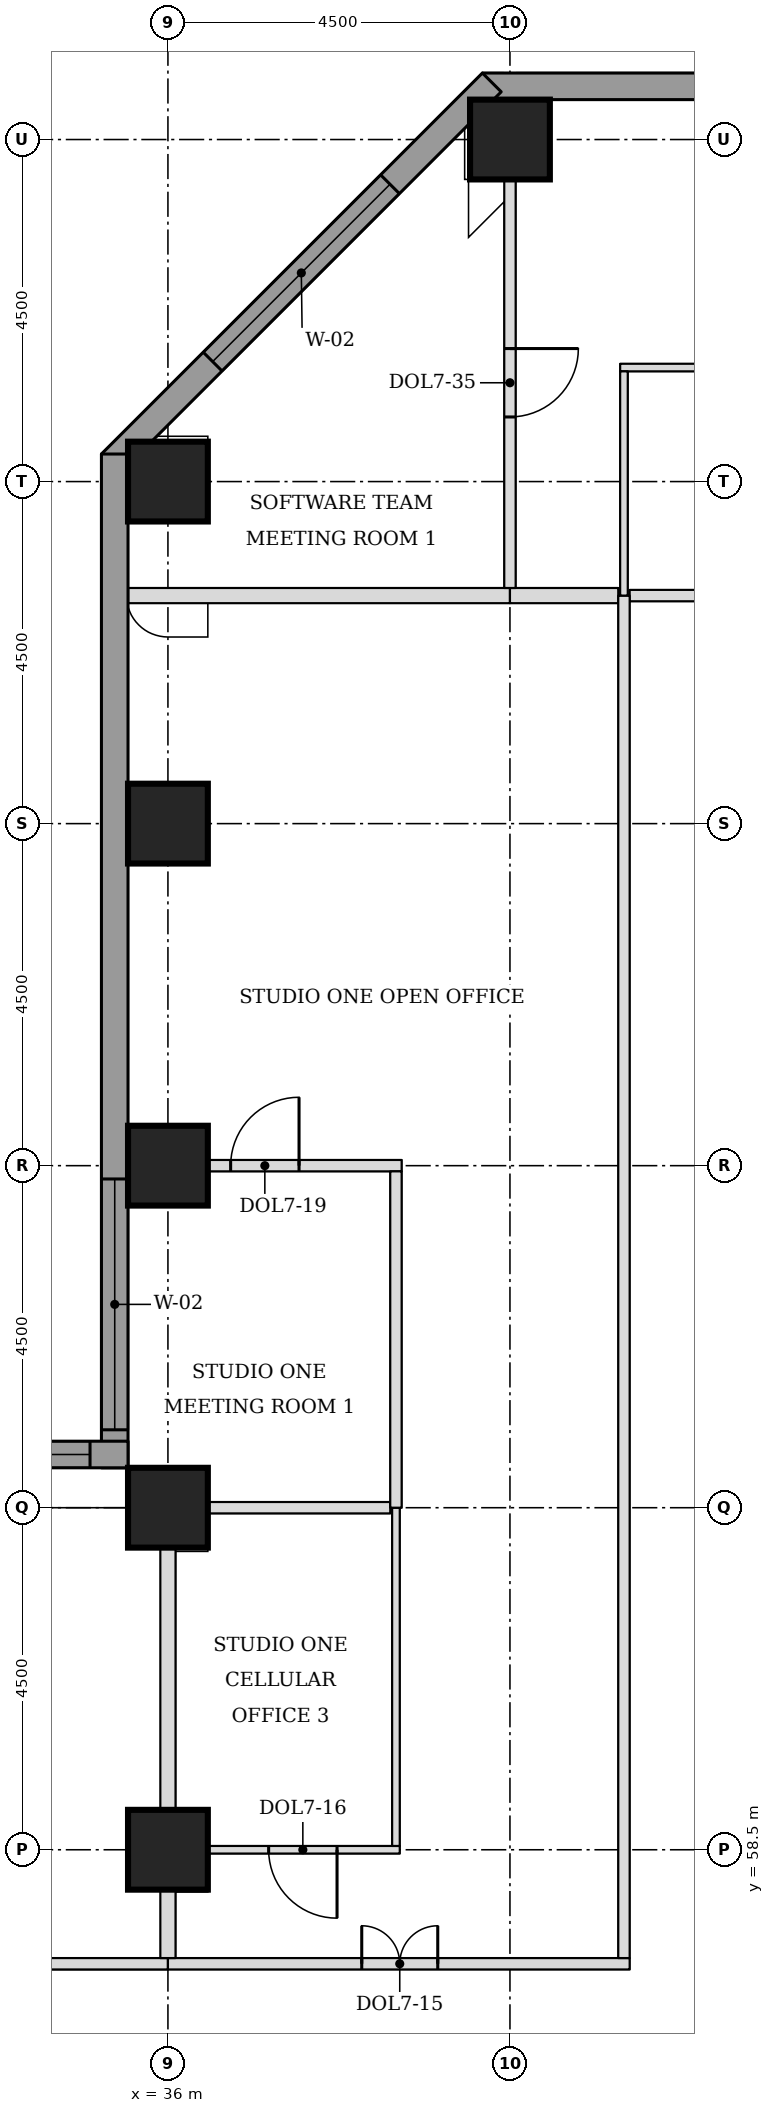
"""IFC4 building model, lengths in metres.
Left out: names, types, materials, properties, quantities, classifications, styles, units other than length and angle.
Written with IfcOpenShell. Run it as: python <this file> out.ifc"""

import sys

from ifc_helpers import new_model, si_unit, direction, frame, frame_2d, origin, origin_2d, place, context, subcontext, project, spatial, rectangle, extrude, element, fill, save


model = new_model("IFC4")
c1 = context("Model", 3, precision=1e-05, world=origin(), true_north=direction((0.0, 1.0)))
c2 = subcontext(c1, "Body", "Model", "MODEL_VIEW")
j1 = project(units=[si_unit("LENGTHUNIT", "METRE"), si_unit("PLANEANGLEUNIT", "RADIAN")], contexts=[c1])
p1 = place(None, origin())
s1 = spatial("IfcSite", under=j1, at=p1, CompositionType="ELEMENT")
p2 = place(p1, origin())
s2 = spatial("IfcBuilding", under=s1, at=p2, CompositionType="ELEMENT")
p3 = place(p2, frame((0.0, 0.0, 127.0)))
s3 = spatial("IfcBuildingStorey", under=s2, at=p3, CompositionType="ELEMENT", Elevation=127.0)
for number, where, z_axis, x_axis in (
    (1, (36.0, 58.5, 0.0), (0.0, 0.0, 1.0), (1.0, 0.0, 0.0)),
    (2, (36.0, 63.0, 0.0), (0.0, 0.0, 1.0), (1.0, 0.0, 0.0)),
    (3, (36.0, 67.5, 0.0), (0.0, 0.0, 1.0), (1.0, 0.0, 0.0)),
    (4, (36.0, 72.0, 0.0), (0.0, 0.0, 1.0), (1.0, 0.0, 0.0)),
    (5, (36.0, 76.5, 0.0), (0.0, 0.0, 1.0), (1.0, 0.0, 0.0)),
    (6, (40.5, 81.0, 0.0), (0.0, 0.0, 1.0), (1.0, 0.0, 0.0)),
):
    element("IfcColumn", number, at=place(p3, frame(where, z_axis=z_axis, x_axis=x_axis)), inside=s3, PredefinedType="COLUMN", context=c2, shape_type="SweptSolid", body=[
        extrude(rectangle(XDim=1.05, YDim=1.05, at=origin_2d()), origin(), (0.0, 0.0, 1.0), 3.7),
    ])
p4 = place(p3, frame((72.362, 81.7, 0.0), z_axis=(0.0, 0.0, 1.0), x_axis=(-1.0, 0.0, 0.0)))
e7 = element("IfcWall", 7, at=p4, inside=s3, PredefinedType="STANDARD", context=c2, shape_type="SweptSolid", body=[
    extrude(rectangle(XDim=32.225, YDim=0.35, at=frame_2d((16.112, 0.0))), origin(), (0.0, 0.0, 1.0), 3.525),
])
p5 = place(p4, frame((5.462, 0.0, 0.9)))
e8 = element("IfcOpeningElement", 8, at=p5, cuts=e7, PredefinedType="OPENING", context=c2, shape_type="SweptSolid", body=[
    extrude(rectangle(XDim=3.3, YDim=1.9, at=frame_2d((1.65, 0.95))), frame((0.0, 0.185, 0.0), z_axis=(0.0, -1.0, 0.0), x_axis=(1.0, 0.0, 0.0)), (0.0, 0.0, 1.0), 0.37),
])
p6 = place(p4, frame((9.962, 0.0, 0.9)))
e9 = element("IfcOpeningElement", 9, at=p6, cuts=e7, PredefinedType="OPENING", context=c2, shape_type="SweptSolid", body=[
    extrude(rectangle(XDim=3.3, YDim=1.9, at=frame_2d((1.65, 0.95))), frame((0.0, 0.185, 0.0), z_axis=(0.0, -1.0, 0.0), x_axis=(1.0, 0.0, 0.0)), (0.0, 0.0, 1.0), 0.37),
])
p7 = place(p4, frame((14.462, 0.0, 0.9)))
e10 = element("IfcOpeningElement", 10, at=p7, cuts=e7, PredefinedType="OPENING", context=c2, shape_type="SweptSolid", body=[
    extrude(rectangle(XDim=3.3, YDim=1.9, at=frame_2d((1.65, 0.95))), frame((0.0, 0.185, 0.0), z_axis=(0.0, -1.0, 0.0), x_axis=(1.0, 0.0, 0.0)), (0.0, 0.0, 1.0), 0.37),
])
p8 = place(p4, frame((18.962, 0.0, 0.9)))
e11 = element("IfcOpeningElement", 11, at=p8, cuts=e7, PredefinedType="OPENING", context=c2, shape_type="SweptSolid", body=[
    extrude(rectangle(XDim=3.3, YDim=1.9, at=frame_2d((1.65, 0.95))), frame((0.0, 0.185, 0.0), z_axis=(0.0, -1.0, 0.0), x_axis=(1.0, 0.0, 0.0)), (0.0, 0.0, 1.0), 0.37),
])
p9 = place(p4, frame((23.462, 0.0, 0.9)))
e12 = element("IfcOpeningElement", 12, at=p9, cuts=e7, PredefinedType="OPENING", context=c2, shape_type="SweptSolid", body=[
    extrude(rectangle(XDim=3.3, YDim=1.9, at=frame_2d((1.65, 0.95))), frame((0.0, 0.185, 0.0), z_axis=(0.0, -1.0, 0.0), x_axis=(1.0, 0.0, 0.0)), (0.0, 0.0, 1.0), 0.37),
])
p10 = place(p3, frame((40.261, 81.751, 0.0), z_axis=(0.0, 0.0, 1.0), x_axis=(-0.707106781187, -0.707106781187, 0.0)))
e13 = element("IfcWall", 13, at=p10, inside=s3, PredefinedType="STANDARD", context=c2, shape_type="SweptSolid", body=[
    extrude(rectangle(XDim=7.089, YDim=0.35, at=frame_2d((3.544, 0.0))), origin(), (0.0, 0.0, 1.0), 3.525),
])
p11 = place(p10, frame((1.894, 0.0, 0.9)))
e14 = element("IfcOpeningElement", 14, at=p11, cuts=e13, PredefinedType="OPENING", context=c2, shape_type="SweptSolid", body=[
    extrude(rectangle(XDim=3.3, YDim=1.9, at=frame_2d((1.65, 0.95))), frame((0.0, 0.185, 0.0), z_axis=(0.0, -1.0, 0.0), x_axis=(1.0, 0.0, 0.0)), (0.0, 0.0, 1.0), 0.37),
])
p12 = place(p3, frame((35.3, 76.862, 0.0), z_axis=(0.0, 0.0, 1.0), x_axis=(0.0, -1.0, 0.0)))
e15 = element("IfcWall", 15, at=p12, inside=s3, PredefinedType="STANDARD", context=c2, shape_type="SweptSolid", body=[
    extrude(rectangle(XDim=13.337, YDim=0.35, at=frame_2d((6.669, 0.0))), origin(), (0.0, 0.0, 1.0), 3.525),
])
p13 = place(p12, frame((9.537, 0.0, 0.9)))
e16 = element("IfcOpeningElement", 16, at=p13, cuts=e15, PredefinedType="OPENING", context=c2, shape_type="SweptSolid", body=[
    extrude(rectangle(XDim=3.3, YDim=1.9, at=frame_2d((1.65, 0.95))), frame((0.0, 0.185, 0.0), z_axis=(0.0, -1.0, 0.0), x_axis=(1.0, 0.0, 0.0)), (0.0, 0.0, 1.0), 0.37),
])
p14 = place(p3, frame((35.475, 63.7, 0.0), z_axis=(0.0, 0.0, 1.0), x_axis=(-1.0, 0.0, 0.0)))
e17 = element("IfcWall", 17, at=p14, inside=s3, PredefinedType="STANDARD", context=c2, shape_type="SweptSolid", body=[
    extrude(rectangle(XDim=17.837, YDim=0.35, at=frame_2d((8.919, 0.0))), origin(), (0.0, 0.0, 1.0), 3.525),
])
p15 = place(p14, frame((0.5, 0.0, 0.9)))
e18 = element("IfcOpeningElement", 18, at=p15, cuts=e17, PredefinedType="OPENING", context=c2, shape_type="SweptSolid", body=[
    extrude(rectangle(XDim=3.3, YDim=1.9, at=frame_2d((1.65, 0.95))), frame((0.0, 0.185, 0.0), z_axis=(0.0, -1.0, 0.0), x_axis=(1.0, 0.0, 0.0)), (0.0, 0.0, 1.0), 0.37),
])
p16 = place(p14, frame((9.075, 0.0, 0.9)))
e19 = element("IfcOpeningElement", 19, at=p16, cuts=e17, PredefinedType="OPENING", context=c2, shape_type="SweptSolid", body=[
    extrude(rectangle(XDim=3.3, YDim=1.9, at=frame_2d((1.65, 0.95))), frame((0.0, 0.185, 0.0), z_axis=(0.0, -1.0, 0.0), x_axis=(1.0, 0.0, 0.0)), (0.0, 0.0, 1.0), 0.37),
])
p17 = place(p3, frame((29.38, 57.0, 0.0), z_axis=(0.0, 0.0, 1.0), x_axis=(1.0, 0.0, 0.0)))
e20 = element("IfcWall", 20, at=p17, inside=s3, PredefinedType="PARTITIONING", context=c2, shape_type="SweptSolid", body=[
    extrude(rectangle(XDim=6.62, YDim=0.15, at=frame_2d((3.31, 0.0))), origin(), (0.0, 0.0, 1.0), 3.55),
])
p18 = place(p17, frame((2.88, 0.0, 0.0)))
e21 = element("IfcOpeningElement", 21, at=p18, cuts=e20, PredefinedType="OPENING", context=c2, shape_type="SweptSolid", body=[
    extrude(rectangle(XDim=1.0, YDim=2.1, at=frame_2d((0.5, 1.05))), frame((0.0, 0.085, 0.0), z_axis=(0.0, -1.0, 0.0), x_axis=(1.0, 0.0, 0.0)), (0.0, 0.0, 1.0), 0.17),
])
p19 = place(p3, frame((36.0, 57.0, 0.0), z_axis=(0.0, 0.0, 1.0), x_axis=(1.0, 0.0, 0.0)))
e22 = element("IfcWall", 22, at=p19, inside=s3, PredefinedType="PARTITIONING", context=c2, shape_type="SweptSolid", body=[
    extrude(rectangle(XDim=6.075, YDim=0.15, at=frame_2d((3.038, 0.0))), origin(), (0.0, 0.0, 1.0), 3.55),
])
p20 = place(p19, frame((2.55, 0.0, 0.0)))
e23 = element("IfcOpeningElement", 23, at=p20, cuts=e22, PredefinedType="OPENING", context=c2, shape_type="SweptSolid", body=[
    extrude(rectangle(XDim=1.0, YDim=2.1, at=frame_2d((0.5, 1.05))), frame((0.0, 0.085, 0.0), z_axis=(0.0, -1.0, 0.0), x_axis=(1.0, 0.0, 0.0)), (0.0, 0.0, 1.0), 0.17),
])
p21 = place(p3, frame((36.525, 58.5, 0.0), z_axis=(0.0, 0.0, 1.0), x_axis=(1.0, 0.0, 0.0)))
e24 = element("IfcWall", 24, at=p21, inside=s3, PredefinedType="PARTITIONING", context=c2, shape_type="SweptSolid", body=[
    extrude(rectangle(XDim=2.525, YDim=0.1, at=frame_2d((1.263, 0.0))), origin(), (0.0, 0.0, 1.0), 3.55),
])
p22 = place(p21, frame((0.8, 0.0, 0.0)))
e25 = element("IfcOpeningElement", 25, at=p22, cuts=e24, PredefinedType="OPENING", context=c2, shape_type="SweptSolid", body=[
    extrude(rectangle(XDim=0.9, YDim=2.1, at=frame_2d((0.45, 1.05))), frame((0.0, 0.06, 0.0), z_axis=(0.0, -1.0, 0.0), x_axis=(1.0, 0.0, 0.0)), (0.0, 0.0, 1.0), 0.12),
])
p23 = place(p3, frame((36.525, 63.0, 0.0), z_axis=(0.0, 0.0, 1.0), x_axis=(1.0, 0.0, 0.0)))
e26 = element("IfcWall", 26, at=p23, inside=s3, PredefinedType="PARTITIONING", context=c2, shape_type="SweptSolid", body=[
    extrude(rectangle(XDim=2.4, YDim=0.15, at=frame_2d((1.2, 0.0))), origin(), (0.0, 0.0, 1.0), 3.55),
])
p24 = place(p3, frame((35.475, 67.5, 0.0), z_axis=(0.0, 0.0, 1.0), x_axis=(1.0, 0.0, 0.0)))
e27 = element("IfcWall", 27, at=p24, inside=s3, PredefinedType="PARTITIONING", context=c2, shape_type="SweptSolid", body=[
    extrude(rectangle(XDim=3.6, YDim=0.15, at=frame_2d((1.8, 0.0))), origin(), (0.0, 0.0, 1.0), 3.55),
])
p25 = place(p24, frame((1.35, 0.0, 0.0)))
e28 = element("IfcOpeningElement", 28, at=p25, cuts=e27, PredefinedType="OPENING", context=c2, shape_type="SweptSolid", body=[
    extrude(rectangle(XDim=0.9, YDim=2.1, at=frame_2d((0.45, 1.05))), frame((0.0, 0.085, 0.0), z_axis=(0.0, -1.0, 0.0), x_axis=(1.0, 0.0, 0.0)), (0.0, 0.0, 1.0), 0.17),
])
p26 = place(p3, frame((35.475, 75.0, 0.0), z_axis=(0.0, 0.0, 1.0), x_axis=(1.0, 0.0, 0.0)))
e29 = element("IfcWall", 29, at=p26, inside=s3, PredefinedType="PARTITIONING", context=c2, shape_type="SweptSolid", body=[
    extrude(rectangle(XDim=5.025, YDim=0.2, at=frame_2d((2.512, 0.0))), origin(), (0.0, 0.0, 1.0), 3.55),
])
p27 = place(p3, frame((40.5, 75.0, 0.0), z_axis=(0.0, 0.0, 1.0), x_axis=(1.0, 0.0, 0.0)))
e30 = element("IfcWall", 30, at=p27, inside=s3, PredefinedType="PARTITIONING", context=c2, shape_type="SweptSolid", body=[
    extrude(rectangle(XDim=1.425, YDim=0.2, at=frame_2d((0.712, 0.0))), origin(), (0.0, 0.0, 1.0), 3.55),
])
p28 = place(p3, frame((42.075, 75.0, 0.0), z_axis=(0.0, 0.0, 1.0), x_axis=(1.0, 0.0, 0.0)))
e31 = element("IfcWall", 31, at=p28, inside=s3, PredefinedType="PARTITIONING", context=c2, shape_type="SweptSolid", body=[
    extrude(rectangle(XDim=4.425, YDim=0.15, at=frame_2d((2.212, 0.0))), origin(), (0.0, 0.0, 1.0), 3.55),
])
p29 = place(p28, frame((1.7, 0.0, 0.0)))
e32 = element("IfcOpeningElement", 32, at=p29, cuts=e31, PredefinedType="OPENING", context=c2, shape_type="SweptSolid", body=[
    extrude(rectangle(XDim=1.0, YDim=2.1, at=frame_2d((0.5, 1.05))), frame((0.0, 0.085, 0.0), z_axis=(0.0, -1.0, 0.0), x_axis=(1.0, 0.0, 0.0)), (0.0, 0.0, 1.0), 0.17),
])
p30 = place(p3, frame((41.95, 78.0, 0.0), z_axis=(0.0, 0.0, 1.0), x_axis=(1.0, 0.0, 0.0)))
e33 = element("IfcWall", 33, at=p30, inside=s3, PredefinedType="PARTITIONING", context=c2, shape_type="SweptSolid", body=[
    extrude(rectangle(XDim=4.6, YDim=0.1, at=frame_2d((2.3, 0.0))), origin(), (0.0, 0.0, 1.0), 3.55),
])
p31 = place(p30, frame((1.85, 0.0, 0.0)))
e34 = element("IfcOpeningElement", 34, at=p31, cuts=e33, PredefinedType="OPENING", context=c2, shape_type="SweptSolid", body=[
    extrude(rectangle(XDim=0.9, YDim=2.1, at=frame_2d((0.45, 1.05))), frame((0.0, 0.06, 0.0), z_axis=(0.0, -1.0, 0.0), x_axis=(1.0, 0.0, 0.0)), (0.0, 0.0, 1.0), 0.12),
])
p32 = place(p3, frame((36.0, 57.075, 0.0), z_axis=(0.0, 0.0, 1.0), x_axis=(0.0, 1.0, 0.0)))
e35 = element("IfcWall", 35, at=p32, inside=s3, PredefinedType="PARTITIONING", context=c2, shape_type="SweptSolid", body=[
    extrude(rectangle(XDim=0.9, YDim=0.2, at=frame_2d((0.45, 0.0))), origin(), (0.0, 0.0, 1.0), 2.8),
])
p33 = place(p3, frame((42.0, 57.075, 0.0), z_axis=(0.0, 0.0, 1.0), x_axis=(0.0, 1.0, 0.0)))
e36 = element("IfcWall", 36, at=p33, inside=s3, PredefinedType="PARTITIONING", context=c2, shape_type="SweptSolid", body=[
    extrude(rectangle(XDim=17.925, YDim=0.15, at=frame_2d((8.962, 0.0))), origin(), (0.0, 0.0, 1.0), 3.55),
])
p34 = place(p3, frame((39.0, 58.55, 0.0), z_axis=(0.0, 0.0, 1.0), x_axis=(0.0, 1.0, 0.0)))
e37 = element("IfcWall", 37, at=p34, inside=s3, PredefinedType="PARTITIONING", context=c2, shape_type="SweptSolid", body=[
    extrude(rectangle(XDim=4.45, YDim=0.1, at=frame_2d((2.225, 0.0))), origin(), (0.0, 0.0, 1.0), 3.55),
])
p35 = place(p3, frame((36.0, 58.995, 0.0), z_axis=(0.0, 0.0, 1.0), x_axis=(0.0, 1.0, 0.0)))
e38 = element("IfcWall", 38, at=p35, inside=s3, PredefinedType="PARTITIONING", context=c2, shape_type="SweptSolid", body=[
    extrude(rectangle(XDim=3.48, YDim=0.2, at=frame_2d((1.74, 0.0))), origin(), (0.0, 0.0, 1.0), 2.8),
])
p36 = place(p3, frame((39.0, 63.0, 0.0), z_axis=(0.0, 0.0, 1.0), x_axis=(0.0, 1.0, 0.0)))
e39 = element("IfcWall", 39, at=p36, inside=s3, PredefinedType="PARTITIONING", context=c2, shape_type="SweptSolid", body=[
    extrude(rectangle(XDim=4.425, YDim=0.15, at=frame_2d((2.212, 0.0))), origin(), (0.0, 0.0, 1.0), 3.55),
])
p37 = place(p3, frame((42.0, 75.0, 0.0), z_axis=(0.0, 0.0, 1.0), x_axis=(0.0, 1.0, 0.0)))
e40 = element("IfcWall", 40, at=p37, inside=s3, PredefinedType="PARTITIONING", context=c2, shape_type="SweptSolid", body=[
    extrude(rectangle(XDim=2.95, YDim=0.1, at=frame_2d((1.475, 0.0))), origin(), (0.0, 0.0, 1.0), 3.55),
])
p38 = place(p3, frame((40.5, 75.1, 0.0), z_axis=(0.0, 0.0, 1.0), x_axis=(0.0, 1.0, 0.0)))
e41 = element("IfcWall", 41, at=p38, inside=s3, PredefinedType="PARTITIONING", context=c2, shape_type="SweptSolid", body=[
    extrude(rectangle(XDim=5.375, YDim=0.15, at=frame_2d((2.688, 0.0))), origin(), (0.0, 0.0, 1.0), 3.55),
])
p39 = place(p38, frame((2.25, 0.0, 0.0)))
e42 = element("IfcOpeningElement", 42, at=p39, cuts=e41, PredefinedType="OPENING", context=c2, shape_type="SweptSolid", body=[
    extrude(rectangle(XDim=0.9, YDim=2.1, at=frame_2d((0.45, 1.05))), frame((0.0, 0.085, 0.0), z_axis=(0.0, -1.0, 0.0), x_axis=(1.0, 0.0, 0.0)), (0.0, 0.0, 1.0), 0.17),
])
p40 = place(p11, origin())
e43 = element("IfcWindow", 43, at=p40, inside=s3, PartitioningType="SINGLE_PANEL", PredefinedType="WINDOW", context=c2, shape_type="SweptSolid", body=[
    extrude(rectangle(XDim=3.3, YDim=1.9, at=frame_2d((1.65, 0.95))), frame((0.0, 0.085, 0.0), z_axis=(0.0, -1.0, 0.0), x_axis=(1.0, 0.0, 0.0)), (0.0, 0.0, 1.0), 0.06),
])
fill(e14, e43)
p41 = place(p13, origin())
e44 = element("IfcWindow", 44, at=p41, inside=s3, PartitioningType="SINGLE_PANEL", PredefinedType="WINDOW", context=c2, shape_type="SweptSolid", body=[
    extrude(rectangle(XDim=3.3, YDim=1.9, at=frame_2d((1.65, 0.95))), frame((0.0, 0.085, 0.0), z_axis=(0.0, -1.0, 0.0), x_axis=(1.0, 0.0, 0.0)), (0.0, 0.0, 1.0), 0.06),
])
fill(e16, e44)
p42 = place(p15, origin())
e45 = element("IfcWindow", 45, at=p42, inside=s3, PartitioningType="SINGLE_PANEL", PredefinedType="WINDOW", context=c2, shape_type="SweptSolid", body=[
    extrude(rectangle(XDim=3.3, YDim=1.9, at=frame_2d((1.65, 0.95))), frame((0.0, 0.085, 0.0), z_axis=(0.0, -1.0, 0.0), x_axis=(1.0, 0.0, 0.0)), (0.0, 0.0, 1.0), 0.06),
])
fill(e18, e45)
p43 = place(p39, frame((0.9, 0.0, 0.0), z_axis=(0.0, 0.0, 1.0), x_axis=(-1.0, 0.0, 0.0)))
e46 = element("IfcDoor", 46, at=p43, inside=s3, OperationType="SINGLE_SWING_LEFT", PredefinedType="DOOR", context=c2, shape_type="SweptSolid", body=[
    extrude(rectangle(XDim=0.9, YDim=2.1, at=frame_2d((0.45, 1.05))), frame((0.0, 0.025, 0.0), z_axis=(0.0, -1.0, 0.0), x_axis=(1.0, 0.0, 0.0)), (0.0, 0.0, 1.0), 0.05),
])
fill(e42, e46)
p44 = place(p20, origin())
e47 = element("IfcDoor", 47, at=p44, inside=s3, OperationType="DOUBLE_DOOR_SINGLE_SWING", PredefinedType="DOOR", context=c2, shape_type="SweptSolid", body=[
    extrude(rectangle(XDim=1.0, YDim=2.1, at=frame_2d((0.5, 1.05))), frame((0.0, 0.025, 0.0), z_axis=(0.0, -1.0, 0.0), x_axis=(1.0, 0.0, 0.0)), (0.0, 0.0, 1.0), 0.05),
])
fill(e23, e47)
p45 = place(p22, frame((0.9, 0.0, 0.0), z_axis=(0.0, 0.0, 1.0), x_axis=(-1.0, 0.0, 0.0)))
e48 = element("IfcDoor", 48, at=p45, inside=s3, OperationType="SINGLE_SWING_LEFT", PredefinedType="DOOR", context=c2, shape_type="SweptSolid", body=[
    extrude(rectangle(XDim=0.9, YDim=2.1, at=frame_2d((0.45, 1.05))), frame((0.0, 0.025, 0.0), z_axis=(0.0, -1.0, 0.0), x_axis=(1.0, 0.0, 0.0)), (0.0, 0.0, 1.0), 0.05),
])
fill(e25, e48)
p46 = place(p25, origin())
e49 = element("IfcDoor", 49, at=p46, inside=s3, OperationType="SINGLE_SWING_RIGHT", PredefinedType="DOOR", context=c2, shape_type="SweptSolid", body=[
    extrude(rectangle(XDim=0.9, YDim=2.1, at=frame_2d((0.45, 1.05))), frame((0.0, 0.025, 0.0), z_axis=(0.0, -1.0, 0.0), x_axis=(1.0, 0.0, 0.0)), (0.0, 0.0, 1.0), 0.05),
])
fill(e28, e49)
save(model, sys.argv[1])
